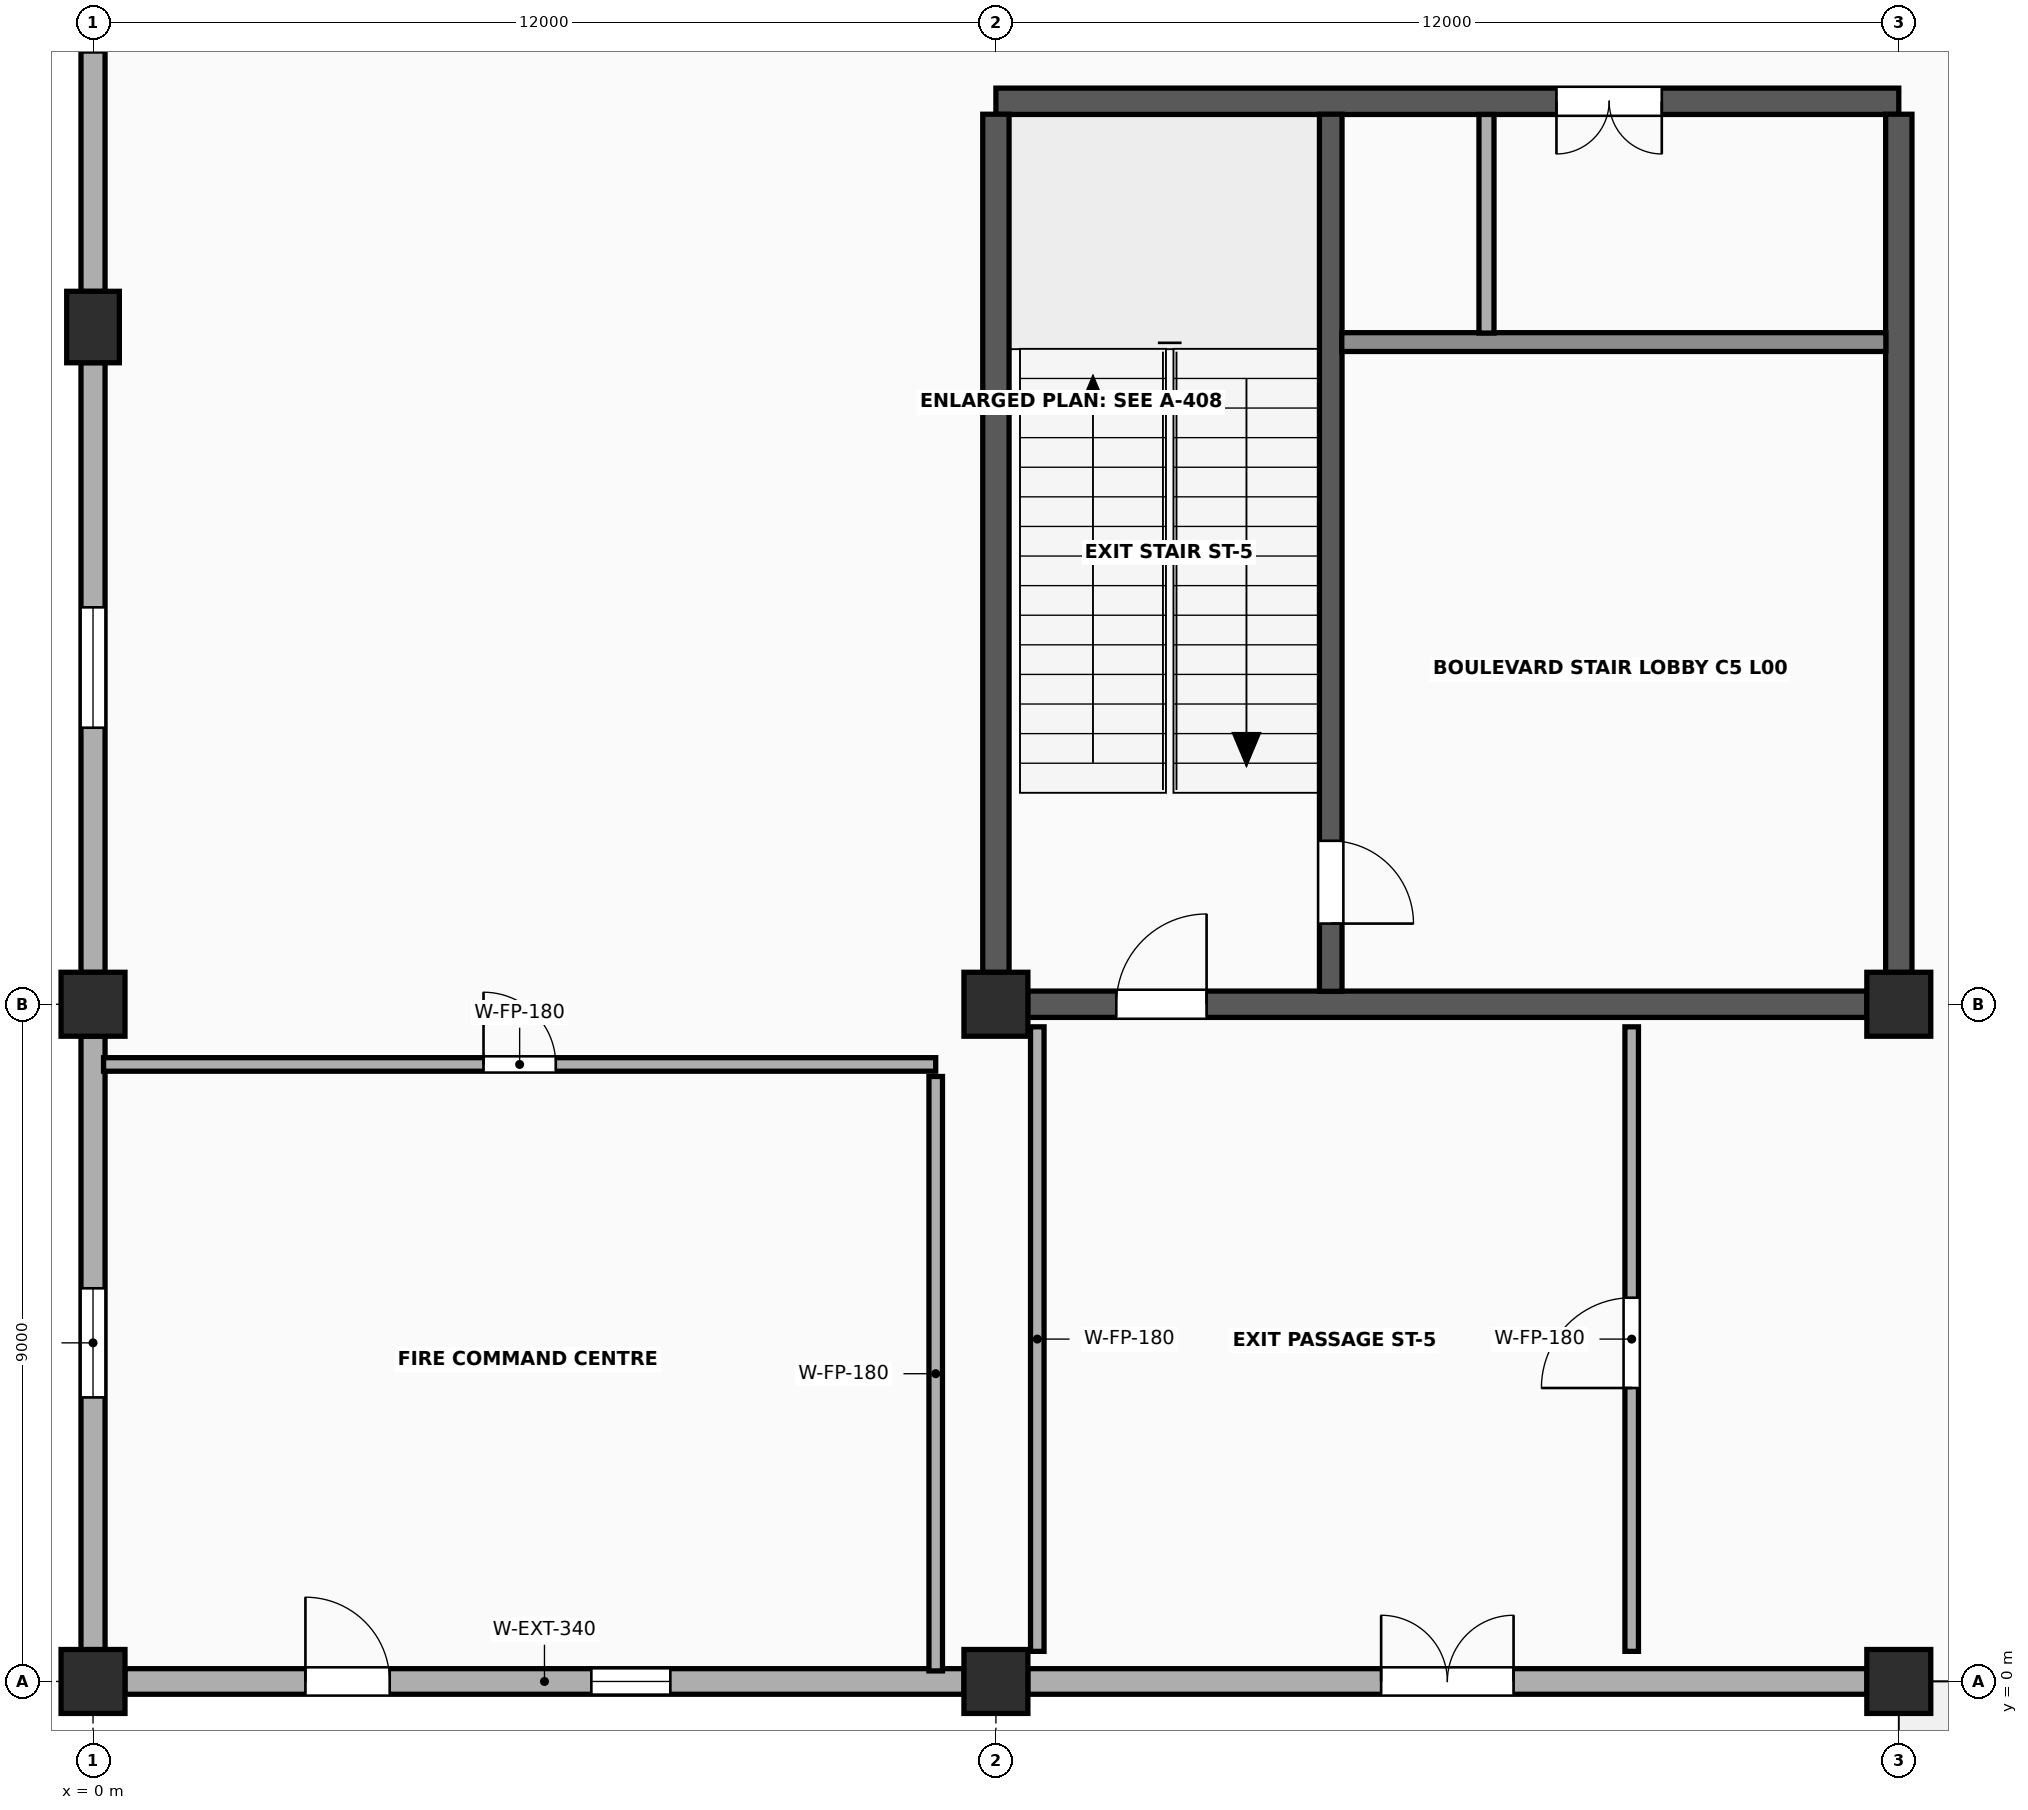
"""IFC4 building model, lengths in metres.
Left out: names, types, materials, properties, quantities, classifications, styles, units other than length and angle.
Written with IfcOpenShell. Run it as: python <this file> out.ifc"""

import sys

from ifc_helpers import new_model, si_unit, direction, frame, frame_2d, origin, origin_2d, place, context, subcontext, project, spatial, rectangle, circle, extrude, element, fill, save


model = new_model("IFC4")
c1 = context("Model", 3, precision=1e-05, world=origin(), true_north=direction((0.0, 1.0)))
c2 = subcontext(c1, "Body", "Model", "MODEL_VIEW")
j1 = project(units=[si_unit("LENGTHUNIT", "METRE"), si_unit("PLANEANGLEUNIT", "RADIAN")], contexts=[c1])
p1 = place(None, origin())
s1 = spatial("IfcSite", under=j1, at=p1, CompositionType="ELEMENT")
p2 = place(p1, origin())
s2 = spatial("IfcBuilding", under=s1, at=p2, CompositionType="ELEMENT")
p3 = place(p2, origin())
s3 = spatial("IfcBuildingStorey", under=s2, at=p3, CompositionType="ELEMENT", Elevation=0.0)
for number, where, z_axis, x_axis in (
    (1, (0.0, 0.0, 0.0), (0.0, 0.0, 1.0), (1.0, 0.0, 0.0)),
    (2, (0.0, 9.0, 0.0), (0.0, 0.0, 1.0), (1.0, 0.0, 0.0)),
):
    element("IfcColumn", number, at=place(p3, frame(where, z_axis=z_axis, x_axis=x_axis)), inside=s3, PredefinedType="COLUMN", context=c2, shape_type="SweptSolid", body=[
        extrude(rectangle(XDim=0.85, YDim=0.85, at=origin_2d()), origin(), (0.0, 0.0, 1.0), 5.4),
    ])
p4 = place(p3, frame((12.0, 0.0, 0.0), z_axis=(0.0, 0.0, 1.0), x_axis=(1.0, 0.0, 0.0)))
e3 = element("IfcColumn", 3, at=p4, inside=s3, PredefinedType="COLUMN", context=c2, shape_type="SweptSolid", body=[
    extrude(circle(Radius=0.425, at=origin_2d()), origin(), (0.0, 0.0, 1.0), 5.4),
])
p5 = place(p3, frame((12.0, 9.0, 0.0), z_axis=(0.0, 0.0, 1.0), x_axis=(1.0, 0.0, 0.0)))
e4 = element("IfcColumn", 4, at=p5, inside=s3, PredefinedType="COLUMN", context=c2, shape_type="SweptSolid", body=[
    extrude(rectangle(XDim=0.85, YDim=0.85, at=origin_2d()), origin(), (0.0, 0.0, 1.0), 5.4),
])
p6 = place(p3, frame((24.0, 0.0, 0.0), z_axis=(0.0, 0.0, 1.0), x_axis=(1.0, 0.0, 0.0)))
e5 = element("IfcColumn", 5, at=p6, inside=s3, PredefinedType="COLUMN", context=c2, shape_type="SweptSolid", body=[
    extrude(circle(Radius=0.425, at=origin_2d()), origin(), (0.0, 0.0, 1.0), 5.4),
])
p7 = place(p3, frame((24.0, 9.0, 0.0), z_axis=(0.0, 0.0, 1.0), x_axis=(1.0, 0.0, 0.0)))
e6 = element("IfcColumn", 6, at=p7, inside=s3, PredefinedType="COLUMN", context=c2, shape_type="SweptSolid", body=[
    extrude(rectangle(XDim=0.85, YDim=0.85, at=origin_2d()), origin(), (0.0, 0.0, 1.0), 5.4),
])
p8 = place(p3, frame((0.0, 18.0, 0.0), z_axis=(0.0, 0.0, 1.0), x_axis=(1.0, 0.0, 0.0)))
e7 = element("IfcColumn", 7, at=p8, inside=s3, PredefinedType="PILASTER", context=c2, shape_type="SweptSolid", body=[
    extrude(rectangle(XDim=0.7, YDim=0.95, at=origin_2d()), origin(), (0.0, 0.0, 1.0), 5.4),
])
p9 = place(p3, frame((12.422, 9.0, 0.0), z_axis=(0.0, 0.0, 1.0), x_axis=(1.0, 0.0, 0.0)))
e8 = element("IfcWall", 8, at=p9, inside=s3, PredefinedType="SHEAR", context=c2, shape_type="SweptSolid", body=[
    extrude(rectangle(XDim=11.156, YDim=0.35, at=frame_2d((5.578, 0.0))), origin(), (0.0, 0.0, 1.0), 5.203),
])
p10 = place(p9, frame((1.178, 0.0, 0.0)))
e9 = element("IfcOpeningElement", 9, at=p10, cuts=e8, PredefinedType="OPENING", context=c2, shape_type="SweptSolid", body=[
    extrude(rectangle(XDim=1.2, YDim=2.2, at=frame_2d((0.6, 1.1))), frame((0.0, 0.19, 0.0), z_axis=(0.0, -1.0, 0.0), x_axis=(1.0, 0.0, 0.0)), (0.0, 0.0, 1.0), 0.38),
])
p11 = place(p3, frame((12.0, 21.0, 0.0), z_axis=(0.0, 0.0, 1.0), x_axis=(1.0, 0.0, 0.0)))
e10 = element("IfcWall", 10, at=p11, inside=s3, PredefinedType="SHEAR", context=c2, shape_type="SweptSolid", body=[
    extrude(rectangle(XDim=12.0, YDim=0.35, at=frame_2d((6.0, 0.0))), origin(), (0.0, 0.0, 1.0), 5.203),
])
p12 = place(p11, frame((7.45, 0.0, 0.0)))
e11 = element("IfcOpeningElement", 11, at=p12, cuts=e10, PredefinedType="OPENING", context=c2, shape_type="SweptSolid", body=[
    extrude(rectangle(XDim=1.4, YDim=2.22, at=frame_2d((0.7, 1.11))), frame((0.0, 0.19, 0.0), z_axis=(0.0, -1.0, 0.0), x_axis=(1.0, 0.0, 0.0)), (0.0, 0.0, 1.0), 0.38),
])
for number, where, z_axis, x_axis in (
    (12, (12.0, 9.422, 0.0), (0.0, 0.0, 1.0), (0.0, 1.0, 0.0)),
    (13, (24.0, 9.422, 0.0), (0.0, 0.0, 1.0), (0.0, 1.0, 0.0)),
):
    element("IfcWall", number, at=place(p3, frame(where, z_axis=z_axis, x_axis=x_axis)), inside=s3, PredefinedType="SHEAR", context=c2, shape_type="SweptSolid", body=[
        extrude(rectangle(XDim=11.406, YDim=0.35, at=frame_2d((5.703, 0.0))), origin(), (0.0, 0.0, 1.0), 5.203),
    ])
p13 = place(p3, frame((16.45, 9.172, 0.0), z_axis=(0.0, 0.0, 1.0), x_axis=(0.0, 1.0, 0.0)))
e14 = element("IfcWall", 14, at=p13, inside=s3, PredefinedType="SHEAR", context=c2, shape_type="SweptSolid", body=[
    extrude(rectangle(XDim=11.656, YDim=0.3, at=frame_2d((5.828, 0.0))), origin(), (0.0, 0.0, 1.0), 5.203),
])
p14 = place(p13, frame((0.9, 0.0, 0.0)))
e15 = element("IfcOpeningElement", 15, at=p14, cuts=e14, PredefinedType="OPENING", context=c2, shape_type="SweptSolid", body=[
    extrude(rectangle(XDim=1.1, YDim=2.2, at=frame_2d((0.55, 1.1))), frame((0.0, 0.165, 0.0), z_axis=(0.0, -1.0, 0.0), x_axis=(1.0, 0.0, 0.0)), (0.0, 0.0, 1.0), 0.33),
])
p15 = place(p3, frame((16.597, 17.8, 0.0), z_axis=(0.0, 0.0, 1.0), x_axis=(1.0, 0.0, 0.0)))
e16 = element("IfcWall", 16, at=p15, inside=s3, PredefinedType="SOLIDWALL", context=c2, shape_type="SweptSolid", body=[
    extrude(rectangle(XDim=7.231, YDim=0.25, at=frame_2d((3.615, 0.0))), origin(), (0.0, 0.0, 1.0), 5.203),
])
p16 = place(p3, frame((18.52, 17.92, 0.0), z_axis=(0.0, 0.0, 1.0), x_axis=(0.0, 1.0, 0.0)))
e17 = element("IfcWall", 17, at=p16, inside=s3, PredefinedType="SOLIDWALL", context=c2, shape_type="SweptSolid", body=[
    extrude(rectangle(XDim=2.905, YDim=0.2, at=frame_2d((1.453, 0.0))), origin(), (0.0, 0.0, 1.0), 5.193),
])
p17 = place(p3, frame((0.423, 0.0, 0.0), z_axis=(0.0, 0.0, 1.0), x_axis=(1.0, 0.0, 0.0)))
e18 = element("IfcWall", 18, at=p17, inside=s3, PredefinedType="SOLIDWALL", context=c2, shape_type="SweptSolid", body=[
    extrude(rectangle(XDim=11.154, YDim=0.34, at=frame_2d((5.577, 0.0))), origin(), (0.0, 0.0, 1.0), 3.85),
])
p18 = place(p17, frame((2.4, 0.0, 0.0)))
e19 = element("IfcOpeningElement", 19, at=p18, cuts=e18, PredefinedType="OPENING", context=c2, shape_type="SweptSolid", body=[
    extrude(rectangle(XDim=1.12, YDim=2.18, at=frame_2d((0.56, 1.09))), frame((0.0, 0.185, 0.0), z_axis=(0.0, -1.0, 0.0), x_axis=(1.0, 0.0, 0.0)), (0.0, 0.0, 1.0), 0.37),
])
p19 = place(p17, frame((6.2, 0.0, 0.95)))
e20 = element("IfcOpeningElement", 20, at=p19, cuts=e18, PredefinedType="OPENING", context=c2, shape_type="SweptSolid", body=[
    extrude(rectangle(XDim=1.05, YDim=1.25, at=frame_2d((0.525, 0.625))), frame((0.0, 0.185, 0.0), z_axis=(0.0, -1.0, 0.0), x_axis=(1.0, 0.0, 0.0)), (0.0, 0.0, 1.0), 0.37),
])
p20 = place(p3, frame((12.423, 0.0, 0.0), z_axis=(0.0, 0.0, 1.0), x_axis=(1.0, 0.0, 0.0)))
e21 = element("IfcWall", 21, at=p20, inside=s3, PredefinedType="SOLIDWALL", context=c2, shape_type="SweptSolid", body=[
    extrude(rectangle(XDim=11.154, YDim=0.34, at=frame_2d((5.577, 0.0))), origin(), (0.0, 0.0, 1.0), 3.85),
])
p21 = place(p20, frame((4.697, 0.0, 0.0)))
e22 = element("IfcOpeningElement", 22, at=p21, cuts=e21, PredefinedType="OPENING", context=c2, shape_type="SweptSolid", body=[
    extrude(rectangle(XDim=1.76, YDim=2.36, at=frame_2d((0.88, 1.18))), frame((0.0, 0.185, 0.0), z_axis=(0.0, -1.0, 0.0), x_axis=(1.0, 0.0, 0.0)), (0.0, 0.0, 1.0), 0.37),
])
p22 = place(p3, frame((0.0, 0.423, 0.0), z_axis=(0.0, 0.0, 1.0), x_axis=(0.0, 1.0, 0.0)))
e23 = element("IfcWall", 23, at=p22, inside=s3, PredefinedType="SOLIDWALL", context=c2, shape_type="SweptSolid", body=[
    extrude(rectangle(XDim=8.154, YDim=0.32, at=frame_2d((4.077, 0.0))), origin(), (0.0, 0.0, 1.0), 3.85),
])
p23 = place(p22, frame((3.352, 0.0, 0.55)))
e24 = element("IfcOpeningElement", 24, at=p23, cuts=e23, PredefinedType="OPENING", context=c2, shape_type="SweptSolid", body=[
    extrude(rectangle(XDim=1.45, YDim=1.25, at=frame_2d((0.725, 0.625))), frame((0.0, 0.175, 0.0), z_axis=(0.0, -1.0, 0.0), x_axis=(1.0, 0.0, 0.0)), (0.0, 0.0, 1.0), 0.35),
])
p24 = place(p3, frame((0.0, 9.423, 0.0), z_axis=(0.0, 0.0, 1.0), x_axis=(0.0, 1.0, 0.0)))
e25 = element("IfcWall", 25, at=p24, inside=s3, PredefinedType="SOLIDWALL", context=c2, shape_type="SweptSolid", body=[
    extrude(rectangle(XDim=8.104, YDim=0.32, at=frame_2d((4.052, 0.0))), origin(), (0.0, 0.0, 1.0), 3.85),
])
p25 = place(p24, frame((3.252, 0.0, 0.55)))
e26 = element("IfcOpeningElement", 26, at=p25, cuts=e25, PredefinedType="OPENING", context=c2, shape_type="SweptSolid", body=[
    extrude(rectangle(XDim=1.6, YDim=1.25, at=frame_2d((0.8, 0.625))), frame((0.0, 0.175, 0.0), z_axis=(0.0, -1.0, 0.0), x_axis=(1.0, 0.0, 0.0)), (0.0, 0.0, 1.0), 0.35),
])
p26 = place(p3, frame((0.0, 18.473, 0.0), z_axis=(0.0, 0.0, 1.0), x_axis=(0.0, 1.0, 0.0)))
e27 = element("IfcWall", 27, at=p26, inside=s3, PredefinedType="SOLIDWALL", context=c2, shape_type="SweptSolid", body=[
    extrude(rectangle(XDim=8.104, YDim=0.32, at=frame_2d((4.052, 0.0))), origin(), (0.0, 0.0, 1.0), 3.85),
])
p27 = place(p26, frame((3.177, 0.0, 0.55)))
e28 = element("IfcOpeningElement", 28, at=p27, cuts=e27, PredefinedType="OPENING", context=c2, shape_type="SweptSolid", body=[
    extrude(rectangle(XDim=1.75, YDim=1.25, at=frame_2d((0.875, 0.625))), frame((0.0, 0.175, 0.0), z_axis=(0.0, -1.0, 0.0), x_axis=(1.0, 0.0, 0.0)), (0.0, 0.0, 1.0), 0.35),
])
p28 = place(p3, frame((0.14, 8.2, 0.0), z_axis=(0.0, 0.0, 1.0), x_axis=(1.0, 0.0, 0.0)))
e29 = element("IfcWall", 29, at=p28, inside=s3, PredefinedType="SOLIDWALL", context=c2, shape_type="SweptSolid", body=[
    extrude(rectangle(XDim=11.06, YDim=0.18, at=frame_2d((5.53, 0.0))), origin(), (0.0, 0.0, 1.0), 2.75),
])
p29 = place(p28, frame((5.05, 0.0, 0.0)))
e30 = element("IfcOpeningElement", 30, at=p29, cuts=e29, PredefinedType="OPENING", context=c2, shape_type="SweptSolid", body=[
    extrude(rectangle(XDim=0.96, YDim=2.12, at=frame_2d((0.48, 1.06))), frame((0.0, 0.105, 0.0), z_axis=(0.0, -1.0, 0.0), x_axis=(1.0, 0.0, 0.0)), (0.0, 0.0, 1.0), 0.21),
])
p30 = place(p3, frame((11.2, 0.14, 0.0), z_axis=(0.0, 0.0, 1.0), x_axis=(0.0, 1.0, 0.0)))
e31 = element("IfcWall", 31, at=p30, inside=s3, PredefinedType="SOLIDWALL", context=c2, shape_type="SweptSolid", body=[
    extrude(rectangle(XDim=7.9, YDim=0.18, at=frame_2d((3.95, 0.0))), origin(), (0.0, 0.0, 1.0), 2.75),
])
p31 = place(p3, frame((12.55, 0.4, 0.0), z_axis=(0.0, 0.0, 1.0), x_axis=(0.0, 1.0, 0.0)))
e32 = element("IfcWall", 32, at=p31, inside=s3, PredefinedType="SOLIDWALL", context=c2, shape_type="SweptSolid", body=[
    extrude(rectangle(XDim=8.3, YDim=0.18, at=frame_2d((4.15, 0.0))), origin(), (0.0, 0.0, 1.0), 2.6),
])
p32 = place(p3, frame((20.45, 0.4, 0.0), z_axis=(0.0, 0.0, 1.0), x_axis=(0.0, 1.0, 0.0)))
e33 = element("IfcWall", 33, at=p32, inside=s3, PredefinedType="SOLIDWALL", context=c2, shape_type="SweptSolid", body=[
    extrude(rectangle(XDim=8.3, YDim=0.18, at=frame_2d((4.15, 0.0))), origin(), (0.0, 0.0, 1.0), 2.6),
])
p33 = place(p32, frame((3.5, 0.0, 0.0)))
e34 = element("IfcOpeningElement", 34, at=p33, cuts=e33, PredefinedType="OPENING", context=c2, shape_type="SweptSolid", body=[
    extrude(rectangle(XDim=1.2, YDim=2.2, at=frame_2d((0.6, 1.1))), frame((0.0, 0.105, 0.0), z_axis=(0.0, -1.0, 0.0), x_axis=(1.0, 0.0, 0.0)), (0.0, 0.0, 1.0), 0.21),
])
p34 = place(p18, frame((1.12, 0.0, 0.0), z_axis=(0.0, 0.0, 1.0), x_axis=(-1.0, 0.0, 0.0)))
e35 = element("IfcDoor", 35, at=p34, inside=s3, OperationType="SINGLE_SWING_LEFT", PredefinedType="DOOR", context=c2, shape_type="SweptSolid", body=[
    extrude(rectangle(XDim=1.12, YDim=2.18, at=frame_2d((0.56, 1.09))), frame((0.0, 0.025, 0.0), z_axis=(0.0, -1.0, 0.0), x_axis=(1.0, 0.0, 0.0)), (0.0, 0.0, 1.0), 0.05),
])
fill(e19, e35)
p35 = place(p19, origin())
e36 = element("IfcWindow", 36, at=p35, inside=s3, PartitioningType="SINGLE_PANEL", PredefinedType="WINDOW", context=c2, shape_type="SweptSolid", body=[
    extrude(rectangle(XDim=1.05, YDim=1.25, at=frame_2d((0.525, 0.625))), frame((0.0, 0.03, 0.0), z_axis=(0.0, -1.0, 0.0), x_axis=(1.0, 0.0, 0.0)), (0.0, 0.0, 1.0), 0.06),
])
fill(e20, e36)
p36 = place(p21, frame((1.76, 0.0, 0.0), z_axis=(0.0, 0.0, 1.0), x_axis=(-1.0, 0.0, 0.0)))
e37 = element("IfcDoor", 37, at=p36, inside=s3, OperationType="DOUBLE_DOOR_SINGLE_SWING", PredefinedType="DOOR", context=c2, shape_type="SweptSolid", body=[
    extrude(rectangle(XDim=1.76, YDim=2.36, at=frame_2d((0.88, 1.18))), frame((0.0, 0.025, 0.0), z_axis=(0.0, -1.0, 0.0), x_axis=(1.0, 0.0, 0.0)), (0.0, 0.0, 1.0), 0.05),
])
fill(e22, e37)
p37 = place(p23, origin())
e38 = element("IfcWindow", 38, at=p37, inside=s3, PartitioningType="SINGLE_PANEL", PredefinedType="WINDOW", context=c2, shape_type="SweptSolid", body=[
    extrude(rectangle(XDim=1.45, YDim=1.25, at=frame_2d((0.725, 0.625))), frame((0.0, 0.03, 0.0), z_axis=(0.0, -1.0, 0.0), x_axis=(1.0, 0.0, 0.0)), (0.0, 0.0, 1.0), 0.06),
])
fill(e24, e38)
p38 = place(p25, origin())
e39 = element("IfcWindow", 39, at=p38, inside=s3, PartitioningType="SINGLE_PANEL", PredefinedType="WINDOW", context=c2, shape_type="SweptSolid", body=[
    extrude(rectangle(XDim=1.6, YDim=1.25, at=frame_2d((0.8, 0.625))), frame((0.0, 0.03, 0.0), z_axis=(0.0, -1.0, 0.0), x_axis=(1.0, 0.0, 0.0)), (0.0, 0.0, 1.0), 0.06),
])
fill(e26, e39)
p39 = place(p14, origin())
e40 = element("IfcDoor", 40, at=p39, inside=s3, OperationType="SINGLE_SWING_LEFT", PredefinedType="DOOR", context=c2, shape_type="SweptSolid", body=[
    extrude(rectangle(XDim=1.1, YDim=2.2, at=frame_2d((0.55, 1.1))), frame((0.0, 0.025, 0.0), z_axis=(0.0, -1.0, 0.0), x_axis=(1.0, 0.0, 0.0)), (0.0, 0.0, 1.0), 0.05),
])
fill(e15, e40)
p40 = place(p12, origin())
e41 = element("IfcDoor", 41, at=p40, inside=s3, OperationType="DOUBLE_DOOR_SINGLE_SWING", PredefinedType="DOOR", context=c2, shape_type="SweptSolid", body=[
    extrude(rectangle(XDim=1.4, YDim=2.22, at=frame_2d((0.7, 1.11))), frame((0.0, 0.025, 0.0), z_axis=(0.0, -1.0, 0.0), x_axis=(1.0, 0.0, 0.0)), (0.0, 0.0, 1.0), 0.05),
])
fill(e11, e41)
p41 = place(p10, frame((1.2, 0.0, 0.0), z_axis=(0.0, 0.0, 1.0), x_axis=(-1.0, 0.0, 0.0)))
e42 = element("IfcDoor", 42, at=p41, inside=s3, OperationType="SINGLE_SWING_RIGHT", PredefinedType="DOOR", context=c2, shape_type="SweptSolid", body=[
    extrude(rectangle(XDim=1.2, YDim=2.2, at=frame_2d((0.6, 1.1))), frame((0.0, 0.025, 0.0), z_axis=(0.0, -1.0, 0.0), x_axis=(1.0, 0.0, 0.0)), (0.0, 0.0, 1.0), 0.05),
])
fill(e9, e42)
p42 = place(p29, origin())
e43 = element("IfcDoor", 43, at=p42, inside=s3, OperationType="SINGLE_SWING_LEFT", PredefinedType="DOOR", context=c2, shape_type="SweptSolid", body=[
    extrude(rectangle(XDim=0.96, YDim=2.12, at=frame_2d((0.48, 1.06))), frame((0.0, 0.025, 0.0), z_axis=(0.0, -1.0, 0.0), x_axis=(1.0, 0.0, 0.0)), (0.0, 0.0, 1.0), 0.05),
])
fill(e30, e43)
p43 = place(p33, frame((1.2, 0.0, 0.0), z_axis=(0.0, 0.0, 1.0), x_axis=(-1.0, 0.0, 0.0)))
e44 = element("IfcDoor", 44, at=p43, inside=s3, OperationType="SINGLE_SWING_LEFT", PredefinedType="DOOR", context=c2, shape_type="SweptSolid", body=[
    extrude(rectangle(XDim=1.2, YDim=2.2, at=frame_2d((0.6, 1.1))), frame((0.0, 0.025, 0.0), z_axis=(0.0, -1.0, 0.0), x_axis=(1.0, 0.0, 0.0)), (0.0, 0.0, 1.0), 0.05),
])
fill(e34, e44)
save(model, sys.argv[1])
